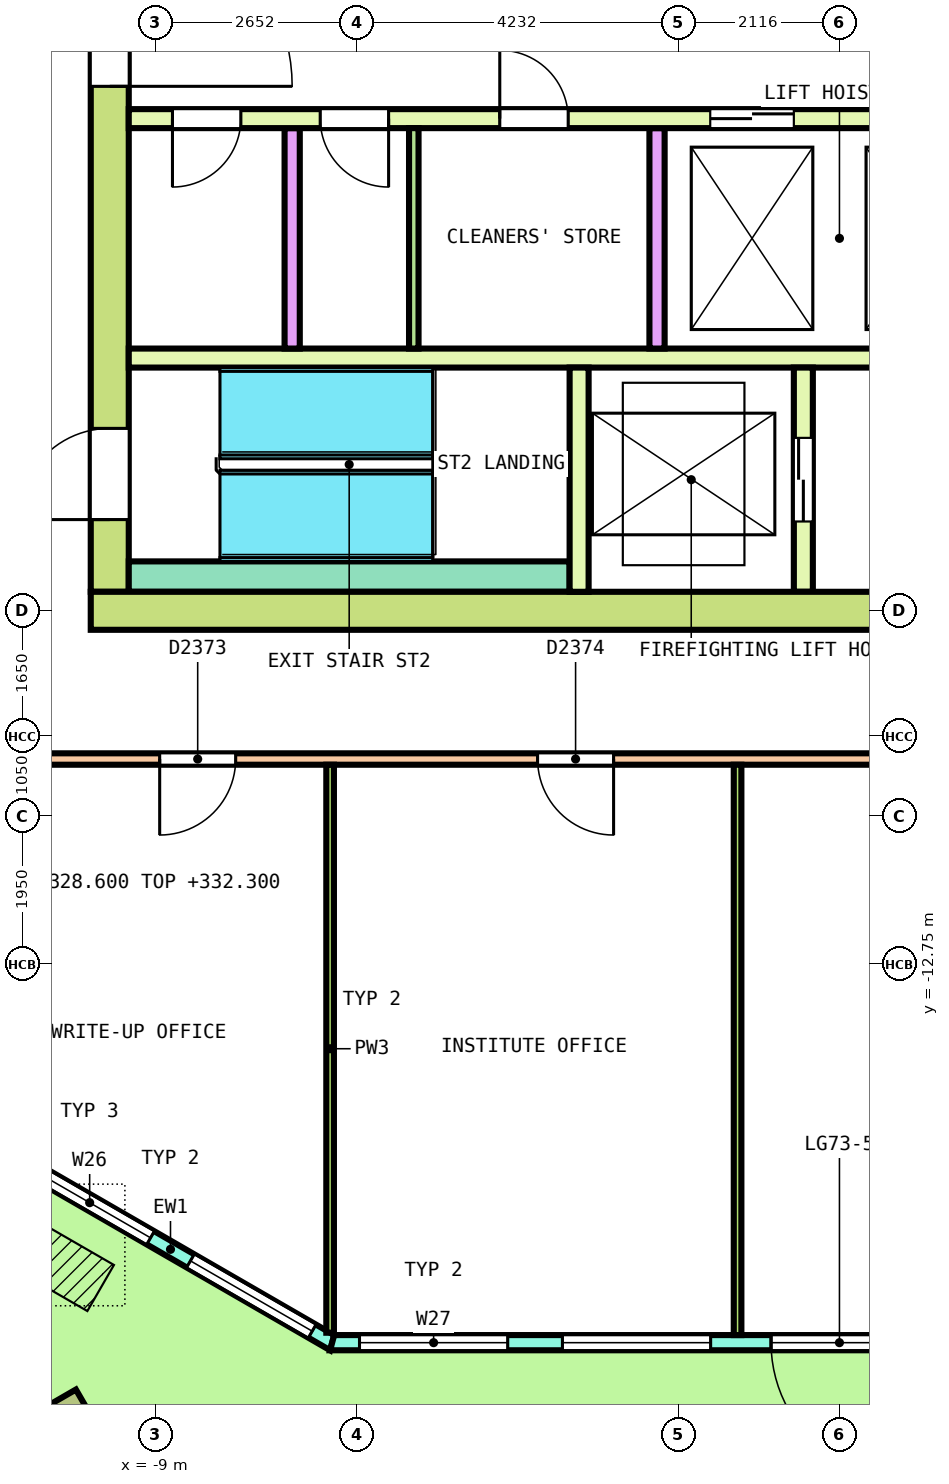
"""IFC4 building model, lengths in metres.
Left out: names, types, materials, properties, quantities, classifications, styles, units other than length and angle.
Written with IfcOpenShell. Run it as: python <this file> out.ifc"""

import sys

from ifc_helpers import new_model, si_unit, direction, frame, frame_2d, origin, origin_2d, place, context, subcontext, project, spatial, polyline, rectangle, outline, extrude, element, fill, save


model = new_model("IFC4")
c1 = context("Model", 3, precision=1e-05, world=origin(), true_north=direction((0.0, 1.0)))
c2 = subcontext(c1, "Body", "Model", "MODEL_VIEW")
j1 = project(units=[si_unit("LENGTHUNIT", "METRE"), si_unit("PLANEANGLEUNIT", "RADIAN")], contexts=[c1])
p1 = place(None, origin())
s1 = spatial("IfcSite", under=j1, at=p1, CompositionType="ELEMENT")
p2 = place(p1, origin())
s2 = spatial("IfcBuilding", under=s1, at=p2, CompositionType="ELEMENT")
p3 = place(p2, frame((0.0, 0.0, 328.6)))
s3 = spatial("IfcBuildingStorey", under=s2, at=p3, CompositionType="ELEMENT", Elevation=328.6)
p4 = place(p3, frame((-10.201, -18.926, 0.0), z_axis=(0.018115165867, -0.031417446337, 0.999342176049), x_axis=(0.865519692755, -0.499889378995, -0.031404939456)))
e1 = element("IfcColumn", 1, at=p4, inside=s3, PredefinedType="COLUMN", context=c2, shape_type="SweptSolid", body=[
    extrude(rectangle(XDim=0.85, YDim=0.85, at=origin_2d()), origin(), (0.0, 0.0, 1.0), 3.652),
])
p5 = place(p3, frame((-10.928, -15.273, 0.0), z_axis=(0.0, 0.0, 1.0), x_axis=(0.866029143232, -0.499993523031, 0.0)))
e2 = element("IfcWall", 2, at=p5, inside=s3, PredefinedType="SOLIDWALL", context=c2, shape_type="SweptSolid", body=[
    extrude(outline(polyline([(-0.027, -0.1), (1.214, -0.1), (2.456, -0.1), (3.697, -0.1), (4.938, -0.1), (4.885, 0.1), (3.67, 0.1), (2.456, 0.1), (1.241, 0.1), (0.027, 0.1), (-0.027, -0.1)])), origin(), (0.0, 0.0, 1.0), 3.7),
])
p6 = place(p5, frame((0.303, 0.0, 0.1)))
e3 = element("IfcOpeningElement", 3, at=p6, cuts=e2, PredefinedType="OPENING", context=c2, shape_type="SweptSolid", body=[
    extrude(rectangle(XDim=1.85, YDim=2.9, at=frame_2d((0.925, 1.45))), frame((0.0, 0.11, 0.0), z_axis=(0.0, -1.0, 0.0), x_axis=(1.0, 0.0, 0.0)), (0.0, 0.0, 1.0), 0.22),
])
p7 = place(p5, frame((2.759, 0.0, 0.1)))
e4 = element("IfcOpeningElement", 4, at=p7, cuts=e2, PredefinedType="OPENING", context=c2, shape_type="SweptSolid", body=[
    extrude(rectangle(XDim=1.85, YDim=2.9, at=frame_2d((0.925, 1.45))), frame((0.0, 0.11, 0.0), z_axis=(0.0, -1.0, 0.0), x_axis=(1.0, 0.0, 0.0)), (0.0, 0.0, 1.0), 0.22),
])
p8 = place(p3, frame((-6.674, -17.729, 0.0), z_axis=(0.0, 0.0, 1.0), x_axis=(1.0, 0.0, 0.0)))
e5 = element("IfcWall", 5, at=p8, inside=s3, PredefinedType="SOLIDWALL", context=c2, shape_type="SweptSolid", body=[
    extrude(outline(polyline([(-0.027, -0.1), (1.004, -0.1), (2.035, -0.1), (3.066, -0.1), (4.097, -0.1), (5.128, -0.1), (6.159, -0.1), (7.189, -0.1), (8.22, -0.1), (9.251, -0.1), (10.282, -0.1), (11.313, -0.1), (12.344, -0.1), (13.375, -0.1), (13.321, 0.1), (12.299, 0.1), (11.276, 0.1), (10.253, 0.1), (9.231, 0.1), (8.208, 0.1), (7.185, 0.1), (6.163, 0.1), (5.14, 0.1), (4.117, 0.1), (3.095, 0.1), (2.072, 0.1), (1.05, 0.1), (0.027, 0.1), (-0.027, -0.1)])), origin(), (0.0, 0.0, 1.0), 3.7),
])
p9 = place(p8, frame((0.36, 0.0, 0.1)))
e6 = element("IfcOpeningElement", 6, at=p9, cuts=e5, PredefinedType="OPENING", context=c2, shape_type="SweptSolid", body=[
    extrude(rectangle(XDim=1.95, YDim=2.9, at=frame_2d((0.975, 1.45))), frame((0.0, 0.11, 0.0), z_axis=(0.0, -1.0, 0.0), x_axis=(1.0, 0.0, 0.0)), (0.0, 0.0, 1.0), 0.22),
])
p10 = place(p8, frame((3.03, 0.0, 0.1)))
e7 = element("IfcOpeningElement", 7, at=p10, cuts=e5, PredefinedType="OPENING", context=c2, shape_type="SweptSolid", body=[
    extrude(rectangle(XDim=1.95, YDim=2.9, at=frame_2d((0.975, 1.45))), frame((0.0, 0.11, 0.0), z_axis=(0.0, -1.0, 0.0), x_axis=(1.0, 0.0, 0.0)), (0.0, 0.0, 1.0), 0.22),
])
p11 = place(p8, frame((5.774, 0.0, 0.0)))
e8 = element("IfcOpeningElement", 8, at=p11, cuts=e5, PredefinedType="OPENING", context=c2, shape_type="SweptSolid", body=[
    extrude(rectangle(XDim=1.8, YDim=2.4, at=frame_2d((0.9, 1.2))), frame((0.0, 0.11, 0.0), z_axis=(0.0, -1.0, 0.0), x_axis=(1.0, 0.0, 0.0)), (0.0, 0.0, 1.0), 0.22),
])
p12 = place(p8, frame((5.774, 0.0, 2.55)))
e9 = element("IfcOpeningElement", 9, at=p12, cuts=e5, PredefinedType="OPENING", context=c2, shape_type="SweptSolid", body=[
    extrude(rectangle(XDim=1.8, YDim=0.45, at=frame_2d((0.9, 0.225))), frame((0.0, 0.11, 0.0), z_axis=(0.0, -1.0, 0.0), x_axis=(1.0, 0.0, 0.0)), (0.0, 0.0, 1.0), 0.22),
])
p13 = place(p8, frame((8.369, 0.0, 0.1)))
e10 = element("IfcOpeningElement", 10, at=p13, cuts=e5, PredefinedType="OPENING", context=c2, shape_type="SweptSolid", body=[
    extrude(rectangle(XDim=1.95, YDim=2.9, at=frame_2d((0.975, 1.45))), frame((0.0, 0.11, 0.0), z_axis=(0.0, -1.0, 0.0), x_axis=(1.0, 0.0, 0.0)), (0.0, 0.0, 1.0), 0.22),
])
p14 = place(p8, frame((11.038, 0.0, 0.1)))
e11 = element("IfcOpeningElement", 11, at=p14, cuts=e5, PredefinedType="OPENING", context=c2, shape_type="SweptSolid", body=[
    extrude(rectangle(XDim=1.95, YDim=2.9, at=frame_2d((0.975, 1.45))), frame((0.0, 0.11, 0.0), z_axis=(0.0, -1.0, 0.0), x_axis=(1.0, 0.0, 0.0)), (0.0, 0.0, 1.0), 0.22),
])
p15 = place(p3, frame((-9.85, -8.1, 0.0), z_axis=(0.0, 0.0, 1.0), x_axis=(1.0, 0.0, 0.0)))
e12 = element("IfcWall", 12, at=p15, inside=s3, PredefinedType="SHEAR", context=c2, shape_type="SweptSolid", body=[
    extrude(rectangle(XDim=19.7, YDim=0.5, at=frame_2d((9.85, 0.0))), origin(), (0.0, 0.0, 1.0), 3.7),
])
p16 = place(p15, frame((11.4, 0.0, 0.0)))
e13 = element("IfcOpeningElement", 13, at=p16, cuts=e12, PredefinedType="OPENING", context=c2, shape_type="SweptSolid", body=[
    extrude(rectangle(XDim=1.2, YDim=2.1, at=frame_2d((0.6, 1.05))), frame((0.0, 0.26, 0.0), z_axis=(0.0, -1.0, 0.0), x_axis=(1.0, 0.0, 0.0)), (0.0, 0.0, 1.0), 0.52),
])
p17 = place(p3, frame((-9.6, -7.85, 0.0), z_axis=(0.0, 0.0, 1.0), x_axis=(0.0, 1.0, 0.0)))
e14 = element("IfcWall", 14, at=p17, inside=s3, PredefinedType="SHEAR", context=c2, shape_type="SweptSolid", body=[
    extrude(rectangle(XDim=15.7, YDim=0.5, at=frame_2d((7.85, 0.0))), origin(), (0.0, 0.0, 1.0), 3.7),
])
p18 = place(p17, frame((6.65, 0.0, 0.0)))
e15 = element("IfcOpeningElement", 15, at=p18, cuts=e14, PredefinedType="OPENING", context=c2, shape_type="SweptSolid", body=[
    extrude(rectangle(XDim=2.4, YDim=2.1, at=frame_2d((1.2, 1.05))), frame((0.0, 0.26, 0.0), z_axis=(0.0, -1.0, 0.0), x_axis=(1.0, 0.0, 0.0)), (0.0, 0.0, 1.0), 0.52),
])
p19 = place(p17, frame((13.55, 0.0, 0.0)))
e16 = element("IfcOpeningElement", 16, at=p19, cuts=e14, PredefinedType="OPENING", context=c2, shape_type="SweptSolid", body=[
    extrude(rectangle(XDim=1.2, YDim=2.1, at=frame_2d((0.6, 1.05))), frame((0.0, 0.26, 0.0), z_axis=(0.0, -1.0, 0.0), x_axis=(1.0, 0.0, 0.0)), (0.0, 0.0, 1.0), 0.52),
])
p20 = place(p17, frame((0.95, 0.0, 0.0)))
e17 = element("IfcOpeningElement", 17, at=p20, cuts=e14, PredefinedType="OPENING", context=c2, shape_type="SweptSolid", body=[
    extrude(rectangle(XDim=1.2, YDim=2.1, at=frame_2d((0.6, 1.05))), frame((0.0, 0.26, 0.0), z_axis=(0.0, -1.0, 0.0), x_axis=(1.0, 0.0, 0.0)), (0.0, 0.0, 1.0), 0.52),
])
p21 = place(p3, frame((-9.35, -1.625, 0.0), z_axis=(0.0, 0.0, 1.0), x_axis=(1.0, 0.0, 0.0)))
e18 = element("IfcWall", 18, at=p21, inside=s3, PredefinedType="SOLIDWALL", context=c2, shape_type="SweptSolid", body=[
    extrude(rectangle(XDim=18.7, YDim=0.25, at=frame_2d((9.35, 0.0))), origin(), (0.0, 0.0, 1.0), 3.7),
])
p22 = place(p21, frame((7.65, 0.0, 0.0)))
e19 = element("IfcOpeningElement", 19, at=p22, cuts=e18, PredefinedType="OPENING", context=c2, shape_type="SweptSolid", body=[
    extrude(rectangle(XDim=1.1, YDim=2.1, at=frame_2d((0.55, 1.05))), frame((0.0, 0.135, 0.0), z_axis=(0.0, -1.0, 0.0), x_axis=(1.0, 0.0, 0.0)), (0.0, 0.0, 1.0), 0.27),
])
p23 = place(p21, frame((9.95, 0.0, 0.0)))
e20 = element("IfcOpeningElement", 20, at=p23, cuts=e18, PredefinedType="OPENING", context=c2, shape_type="SweptSolid", body=[
    extrude(rectangle(XDim=1.1, YDim=2.1, at=frame_2d((0.55, 1.05))), frame((0.0, 0.135, 0.0), z_axis=(0.0, -1.0, 0.0), x_axis=(1.0, 0.0, 0.0)), (0.0, 0.0, 1.0), 0.27),
])
p24 = place(p21, frame((12.4, 0.0, 0.0)))
e21 = element("IfcOpeningElement", 21, at=p24, cuts=e18, PredefinedType="OPENING", context=c2, shape_type="SweptSolid", body=[
    extrude(rectangle(XDim=1.1, YDim=2.1, at=frame_2d((0.55, 1.05))), frame((0.0, 0.135, 0.0), z_axis=(0.0, -1.0, 0.0), x_axis=(1.0, 0.0, 0.0)), (0.0, 0.0, 1.0), 0.27),
])
p25 = place(p21, frame((0.575, 0.0, 0.0)))
e22 = element("IfcOpeningElement", 22, at=p25, cuts=e18, PredefinedType="OPENING", context=c2, shape_type="SweptSolid", body=[
    extrude(rectangle(XDim=0.9, YDim=2.1, at=frame_2d((0.45, 1.05))), frame((0.0, 0.135, 0.0), z_axis=(0.0, -1.0, 0.0), x_axis=(1.0, 0.0, 0.0)), (0.0, 0.0, 1.0), 0.27),
])
p26 = place(p21, frame((2.519, 0.0, 0.0)))
e23 = element("IfcOpeningElement", 23, at=p26, cuts=e18, PredefinedType="OPENING", context=c2, shape_type="SweptSolid", body=[
    extrude(rectangle(XDim=0.9, YDim=2.1, at=frame_2d((0.45, 1.05))), frame((0.0, 0.135, 0.0), z_axis=(0.0, -1.0, 0.0), x_axis=(1.0, 0.0, 0.0)), (0.0, 0.0, 1.0), 0.27),
])
p27 = place(p21, frame((4.881, 0.0, 0.0)))
e24 = element("IfcOpeningElement", 24, at=p27, cuts=e18, PredefinedType="OPENING", context=c2, shape_type="SweptSolid", body=[
    extrude(rectangle(XDim=0.9, YDim=2.1, at=frame_2d((0.45, 1.05))), frame((0.0, 0.135, 0.0), z_axis=(0.0, -1.0, 0.0), x_axis=(1.0, 0.0, 0.0)), (0.0, 0.0, 1.0), 0.27),
])
p28 = place(p21, frame((14.9, 0.0, 0.0)))
e25 = element("IfcOpeningElement", 25, at=p28, cuts=e18, PredefinedType="OPENING", context=c2, shape_type="SweptSolid", body=[
    extrude(rectangle(XDim=0.9, YDim=2.1, at=frame_2d((0.45, 1.05))), frame((0.0, 0.135, 0.0), z_axis=(0.0, -1.0, 0.0), x_axis=(1.0, 0.0, 0.0)), (0.0, 0.0, 1.0), 0.27),
])
p29 = place(p21, frame((17.225, 0.0, 0.0)))
e26 = element("IfcOpeningElement", 26, at=p29, cuts=e18, PredefinedType="OPENING", context=c2, shape_type="SweptSolid", body=[
    extrude(rectangle(XDim=0.9, YDim=2.1, at=frame_2d((0.45, 1.05))), frame((0.0, 0.135, 0.0), z_axis=(0.0, -1.0, 0.0), x_axis=(1.0, 0.0, 0.0)), (0.0, 0.0, 1.0), 0.27),
])
p30 = place(p3, frame((-9.35, -4.775, 0.0), z_axis=(0.0, 0.0, 1.0), x_axis=(1.0, 0.0, 0.0)))
e27 = element("IfcWall", 27, at=p30, inside=s3, PredefinedType="SOLIDWALL", context=c2, shape_type="SweptSolid", body=[
    extrude(rectangle(XDim=18.7, YDim=0.25, at=frame_2d((9.35, 0.0))), origin(), (0.0, 0.0, 1.0), 3.7),
])
for number, where, z_axis, x_axis in (
    (28, (-7.2, -4.65, 0.0), (0.0, 0.0, 1.0), (0.0, 1.0, 0.0)),
    (29, (-2.4, -4.65, 0.0), (0.0, 0.0, 1.0), (0.0, 1.0, 0.0)),
):
    element("IfcWall", number, at=place(p3, frame(where, z_axis=z_axis, x_axis=x_axis)), inside=s3, PredefinedType="SOLIDWALL", context=c2, shape_type="SweptSolid", body=[
        extrude(rectangle(XDim=2.9, YDim=0.2, at=frame_2d((1.45, 0.0))), origin(), (0.0, 0.0, 1.0), 3.7),
    ])
p31 = place(p3, frame((-9.35, -7.65, 0.0), z_axis=(0.0, 0.0, 1.0), x_axis=(1.0, 0.0, 0.0)))
e30 = element("IfcWall", 30, at=p31, inside=s3, PredefinedType="SOLIDWALL", context=c2, shape_type="SweptSolid", body=[
    extrude(rectangle(XDim=5.8, YDim=0.4, at=frame_2d((2.9, 0.0))), origin(), (0.0, 0.0, 1.0), 3.7),
])
p32 = place(p3, frame((-3.425, -7.85, 0.0), z_axis=(0.0, 0.0, 1.0), x_axis=(0.0, 1.0, 0.0)))
e31 = element("IfcWall", 31, at=p32, inside=s3, PredefinedType="SOLIDWALL", context=c2, shape_type="SweptSolid", body=[
    extrude(rectangle(XDim=2.95, YDim=0.25, at=frame_2d((1.475, 0.0))), origin(), (0.0, 0.0, 1.0), 3.7),
])
p33 = place(p3, frame((-0.475, -7.85, 0.0), z_axis=(0.0, 0.0, 1.0), x_axis=(0.0, 1.0, 0.0)))
e32 = element("IfcWall", 32, at=p33, inside=s3, PredefinedType="SOLIDWALL", context=c2, shape_type="SweptSolid", body=[
    extrude(rectangle(XDim=2.95, YDim=0.25, at=frame_2d((1.475, 0.0))), origin(), (0.0, 0.0, 1.0), 3.7),
])
p34 = place(p33, frame((0.925, 0.0, 0.0)))
e33 = element("IfcOpeningElement", 33, at=p34, cuts=e32, PredefinedType="OPENING", context=c2, shape_type="SweptSolid", body=[
    extrude(rectangle(XDim=1.1, YDim=2.1, at=frame_2d((0.55, 1.05))), frame((0.0, 0.135, 0.0), z_axis=(0.0, -1.0, 0.0), x_axis=(1.0, 0.0, 0.0)), (0.0, 0.0, 1.0), 0.27),
])
p35 = place(p3, frame((-5.6, -4.65, 0.0), z_axis=(0.0, 0.0, 1.0), x_axis=(0.0, 1.0, 0.0)))
e34 = element("IfcWall", 34, at=p35, inside=s3, PredefinedType="PARTITIONING", context=c2, shape_type="SweptSolid", body=[
    extrude(rectangle(XDim=2.9, YDim=0.125, at=frame_2d((1.45, 0.0))), origin(), (0.0, 0.0, 1.0), 3.7),
])
p36 = place(p3, frame((-11.025, -10.05, 0.0), z_axis=(0.0, 0.0, 1.0), x_axis=(1.0, 0.0, 0.0)))
e35 = element("IfcWall", 35, at=p36, inside=s3, PredefinedType="PARTITIONING", context=c2, shape_type="SweptSolid", body=[
    extrude(rectangle(XDim=21.925, YDim=0.15, at=frame_2d((10.962, 0.0))), origin(), (0.0, 0.0, 1.0), 3.05),
])
p37 = place(p36, frame((2.082, 0.0, 0.0)))
e36 = element("IfcOpeningElement", 36, at=p37, cuts=e35, PredefinedType="OPENING", context=c2, shape_type="SweptSolid", body=[
    extrude(rectangle(XDim=1.0, YDim=2.1, at=frame_2d((0.5, 1.05))), frame((0.0, 0.085, 0.0), z_axis=(0.0, -1.0, 0.0), x_axis=(1.0, 0.0, 0.0)), (0.0, 0.0, 1.0), 0.17),
])
p38 = place(p36, frame((7.054, 0.0, 0.0)))
e37 = element("IfcOpeningElement", 37, at=p38, cuts=e35, PredefinedType="OPENING", context=c2, shape_type="SweptSolid", body=[
    extrude(rectangle(XDim=1.0, YDim=2.1, at=frame_2d((0.5, 1.05))), frame((0.0, 0.085, 0.0), z_axis=(0.0, -1.0, 0.0), x_axis=(1.0, 0.0, 0.0)), (0.0, 0.0, 1.0), 0.17),
])
p39 = place(p36, frame((12.254, 0.0, 0.0)))
e38 = element("IfcOpeningElement", 38, at=p39, cuts=e35, PredefinedType="OPENING", context=c2, shape_type="SweptSolid", body=[
    extrude(rectangle(XDim=1.0, YDim=2.1, at=frame_2d((0.5, 1.05))), frame((0.0, 0.085, 0.0), z_axis=(0.0, -1.0, 0.0), x_axis=(1.0, 0.0, 0.0)), (0.0, 0.0, 1.0), 0.17),
])
p40 = place(p36, frame((18.233, 0.0, 0.0)))
e39 = element("IfcOpeningElement", 39, at=p40, cuts=e35, PredefinedType="OPENING", context=c2, shape_type="SweptSolid", body=[
    extrude(rectangle(XDim=1.0, YDim=2.1, at=frame_2d((0.5, 1.05))), frame((0.0, 0.085, 0.0), z_axis=(0.0, -1.0, 0.0), x_axis=(1.0, 0.0, 0.0)), (0.0, 0.0, 1.0), 0.17),
])
p41 = place(p36, frame((20.525, 0.0, 0.0)))
e40 = element("IfcOpeningElement", 40, at=p41, cuts=e35, PredefinedType="OPENING", context=c2, shape_type="SweptSolid", body=[
    extrude(rectangle(XDim=1.0, YDim=2.1, at=frame_2d((0.5, 1.05))), frame((0.0, 0.085, 0.0), z_axis=(0.0, -1.0, 0.0), x_axis=(1.0, 0.0, 0.0)), (0.0, 0.0, 1.0), 0.17),
])
p42 = place(p3, frame((-6.701, -17.598, 0.0), z_axis=(0.0, 0.0, 1.0), x_axis=(0.0, 1.0, 0.0)))
e41 = element("IfcWall", 41, at=p42, inside=s3, PredefinedType="PARTITIONING", context=c2, shape_type="SweptSolid", body=[
    extrude(rectangle(XDim=7.473, YDim=0.1, at=frame_2d((3.736, 0.0))), origin(), (0.0, 0.0, 1.0), 3.05),
])
p43 = place(p3, frame((-1.34, -17.628, 0.0), z_axis=(0.0, 0.0, 1.0), x_axis=(0.0, 1.0, 0.0)))
e42 = element("IfcWall", 42, at=p43, inside=s3, PredefinedType="PARTITIONING", context=c2, shape_type="SweptSolid", body=[
    extrude(rectangle(XDim=7.503, YDim=0.1, at=frame_2d((3.752, 0.0))), origin(), (0.0, 0.0, 1.0), 3.05),
])
p44 = place(p6, origin())
e43 = element("IfcWindow", 43, at=p44, inside=s3, PartitioningType="SINGLE_PANEL", PredefinedType="WINDOW", context=c2, shape_type="SweptSolid", body=[
    extrude(rectangle(XDim=1.85, YDim=2.9, at=frame_2d((0.925, 1.45))), frame((0.0, 0.03, 0.0), z_axis=(0.0, -1.0, 0.0), x_axis=(1.0, 0.0, 0.0)), (0.0, 0.0, 1.0), 0.06),
])
fill(e3, e43)
p45 = place(p7, origin())
e44 = element("IfcWindow", 44, at=p45, inside=s3, PartitioningType="SINGLE_PANEL", PredefinedType="WINDOW", context=c2, shape_type="SweptSolid", body=[
    extrude(rectangle(XDim=1.85, YDim=2.9, at=frame_2d((0.925, 1.45))), frame((0.0, 0.03, 0.0), z_axis=(0.0, -1.0, 0.0), x_axis=(1.0, 0.0, 0.0)), (0.0, 0.0, 1.0), 0.06),
])
fill(e4, e44)
p46 = place(p9, origin())
e45 = element("IfcWindow", 45, at=p46, inside=s3, PartitioningType="SINGLE_PANEL", PredefinedType="WINDOW", context=c2, shape_type="SweptSolid", body=[
    extrude(rectangle(XDim=1.95, YDim=2.9, at=frame_2d((0.975, 1.45))), frame((0.0, 0.03, 0.0), z_axis=(0.0, -1.0, 0.0), x_axis=(1.0, 0.0, 0.0)), (0.0, 0.0, 1.0), 0.06),
])
fill(e6, e45)
p47 = place(p10, origin())
e46 = element("IfcWindow", 46, at=p47, inside=s3, PartitioningType="SINGLE_PANEL", PredefinedType="WINDOW", context=c2, shape_type="SweptSolid", body=[
    extrude(rectangle(XDim=1.95, YDim=2.9, at=frame_2d((0.975, 1.45))), frame((0.0, 0.03, 0.0), z_axis=(0.0, -1.0, 0.0), x_axis=(1.0, 0.0, 0.0)), (0.0, 0.0, 1.0), 0.06),
])
fill(e7, e46)
p48 = place(p11, origin())
e47 = element("IfcDoor", 47, at=p48, inside=s3, OperationType="DOUBLE_DOOR_SINGLE_SWING", PredefinedType="DOOR", context=c2, shape_type="SweptSolid", body=[
    extrude(rectangle(XDim=1.8, YDim=2.4, at=frame_2d((0.9, 1.2))), frame((0.0, 0.025, 0.0), z_axis=(0.0, -1.0, 0.0), x_axis=(1.0, 0.0, 0.0)), (0.0, 0.0, 1.0), 0.05),
])
fill(e8, e47)
p49 = place(p12, origin())
e48 = element("IfcWindow", 48, at=p49, inside=s3, PartitioningType="SINGLE_PANEL", PredefinedType="WINDOW", context=c2, shape_type="SweptSolid", body=[
    extrude(rectangle(XDim=1.8, YDim=0.45, at=frame_2d((0.9, 0.225))), frame((0.0, 0.03, 0.0), z_axis=(0.0, -1.0, 0.0), x_axis=(1.0, 0.0, 0.0)), (0.0, 0.0, 1.0), 0.06),
])
fill(e9, e48)
p50 = place(p22, origin())
e49 = element("IfcDoor", 49, at=p50, inside=s3, OperationType="DOUBLE_DOOR_SLIDING", PredefinedType="DOOR", context=c2, shape_type="SweptSolid", body=[
    extrude(rectangle(XDim=1.1, YDim=2.1, at=frame_2d((0.55, 1.05))), frame((0.0, 0.075, 0.0), z_axis=(0.0, -1.0, 0.0), x_axis=(1.0, 0.0, 0.0)), (0.0, 0.0, 1.0), 0.15),
])
fill(e19, e49)
p51 = place(p34, origin())
e50 = element("IfcDoor", 50, at=p51, inside=s3, OperationType="DOUBLE_DOOR_SLIDING", PredefinedType="DOOR", context=c2, shape_type="SweptSolid", body=[
    extrude(rectangle(XDim=1.1, YDim=2.1, at=frame_2d((0.55, 1.05))), frame((0.0, 0.075, 0.0), z_axis=(0.0, -1.0, 0.0), x_axis=(1.0, 0.0, 0.0)), (0.0, 0.0, 1.0), 0.15),
])
fill(e33, e50)
p52 = place(p18, origin())
e51 = element("IfcDoor", 51, at=p52, inside=s3, OperationType="DOUBLE_DOOR_SINGLE_SWING", PredefinedType="DOOR", context=c2, shape_type="SweptSolid", body=[
    extrude(rectangle(XDim=2.4, YDim=2.1, at=frame_2d((1.2, 1.05))), frame((0.0, 0.2, 0.0), z_axis=(0.0, -1.0, 0.0), x_axis=(1.0, 0.0, 0.0)), (0.0, 0.0, 1.0), 0.4),
])
fill(e15, e51)
p53 = place(p20, origin())
e52 = element("IfcDoor", 52, at=p53, inside=s3, OperationType="SINGLE_SWING_LEFT", PredefinedType="DOOR", context=c2, shape_type="SweptSolid", body=[
    extrude(rectangle(XDim=1.2, YDim=2.1, at=frame_2d((0.6, 1.05))), frame((0.0, 0.2, 0.0), z_axis=(0.0, -1.0, 0.0), x_axis=(1.0, 0.0, 0.0)), (0.0, 0.0, 1.0), 0.4),
])
fill(e17, e52)
p54 = place(p25, origin())
e53 = element("IfcDoor", 53, at=p54, inside=s3, OperationType="SINGLE_SWING_LEFT", PredefinedType="DOOR", context=c2, shape_type="SweptSolid", body=[
    extrude(rectangle(XDim=0.9, YDim=2.1, at=frame_2d((0.45, 1.05))), frame((0.0, 0.075, 0.0), z_axis=(0.0, -1.0, 0.0), x_axis=(1.0, 0.0, 0.0)), (0.0, 0.0, 1.0), 0.15),
])
fill(e22, e53)
p55 = place(p26, origin())
e54 = element("IfcDoor", 54, at=p55, inside=s3, OperationType="SINGLE_SWING_RIGHT", PredefinedType="DOOR", context=c2, shape_type="SweptSolid", body=[
    extrude(rectangle(XDim=0.9, YDim=2.1, at=frame_2d((0.45, 1.05))), frame((0.0, 0.075, 0.0), z_axis=(0.0, -1.0, 0.0), x_axis=(1.0, 0.0, 0.0)), (0.0, 0.0, 1.0), 0.15),
])
fill(e23, e54)
p56 = place(p27, origin())
e55 = element("IfcDoor", 55, at=p56, inside=s3, OperationType="SINGLE_SWING_LEFT", PredefinedType="DOOR", context=c2, shape_type="SweptSolid", body=[
    extrude(rectangle(XDim=0.9, YDim=2.1, at=frame_2d((0.45, 1.05))), frame((0.0, 0.075, 0.0), z_axis=(0.0, -1.0, 0.0), x_axis=(1.0, 0.0, 0.0)), (0.0, 0.0, 1.0), 0.15),
])
fill(e24, e55)
p57 = place(p37, origin())
e56 = element("IfcDoor", 56, at=p57, inside=s3, OperationType="SINGLE_SWING_RIGHT", PredefinedType="DOOR", context=c2, shape_type="SweptSolid", body=[
    extrude(rectangle(XDim=1.0, YDim=2.1, at=frame_2d((0.5, 1.05))), frame((0.0, 0.025, 0.0), z_axis=(0.0, -1.0, 0.0), x_axis=(1.0, 0.0, 0.0)), (0.0, 0.0, 1.0), 0.05),
])
fill(e36, e56)
p58 = place(p38, origin())
e57 = element("IfcDoor", 57, at=p58, inside=s3, OperationType="SINGLE_SWING_LEFT", PredefinedType="DOOR", context=c2, shape_type="SweptSolid", body=[
    extrude(rectangle(XDim=1.0, YDim=2.1, at=frame_2d((0.5, 1.05))), frame((0.0, 0.025, 0.0), z_axis=(0.0, -1.0, 0.0), x_axis=(1.0, 0.0, 0.0)), (0.0, 0.0, 1.0), 0.05),
])
fill(e37, e57)
save(model, sys.argv[1])
